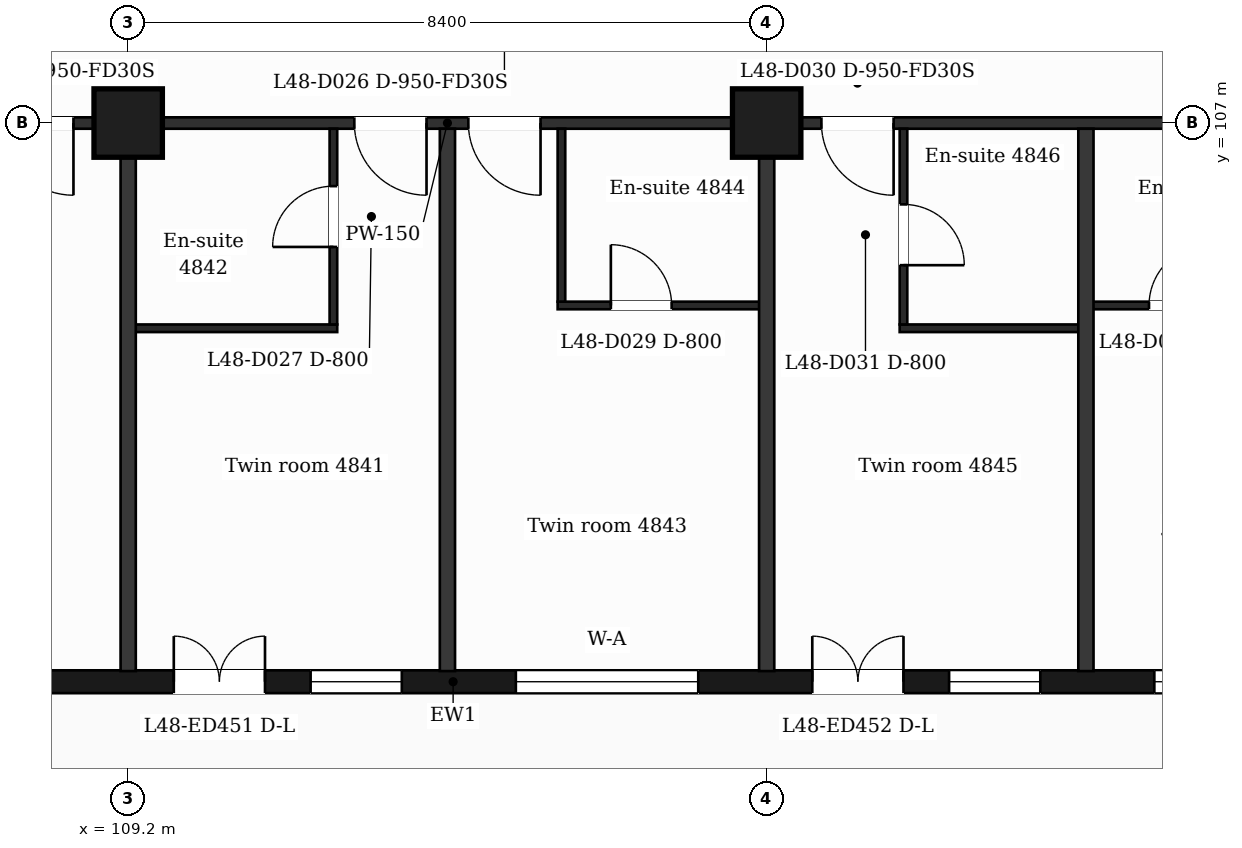
"""IFC4 building model, lengths in metres.
Left out: names, types, materials, properties, quantities, classifications, styles, units other than length and angle.
Written with IfcOpenShell. Run it as: python <this file> out.ifc"""

import sys

from ifc_helpers import new_model, si_unit, direction, frame, frame_2d, origin, origin_2d, place, context, subcontext, project, spatial, rectangle, extrude, element, fill, save


model = new_model("IFC4")
c1 = context("Model", 3, precision=1e-05, world=origin(), true_north=direction((0.0, 1.0)))
c2 = subcontext(c1, "Body", "Model", "MODEL_VIEW")
j1 = project(units=[si_unit("LENGTHUNIT", "METRE"), si_unit("PLANEANGLEUNIT", "RADIAN")], contexts=[c1])
p1 = place(None, origin())
s1 = spatial("IfcSite", under=j1, at=p1, CompositionType="ELEMENT")
p2 = place(p1, origin())
s2 = spatial("IfcBuilding", under=s1, at=p2, CompositionType="ELEMENT")
p3 = place(p2, frame((0.0, 0.0, 202.2)))
s3 = spatial("IfcBuildingStorey", under=s2, at=p3, CompositionType="ELEMENT", Elevation=202.2)
for number, where, z_axis, x_axis in (
    (1, (109.2, 107.0, 0.0), (0.0, 0.0, 1.0), (1.0, 0.0, 0.0)),
    (2, (117.6, 107.0, 0.0), (0.0, 0.0, 1.0), (1.0, 0.0, 0.0)),
):
    element("IfcColumn", number, at=place(p3, frame(where, z_axis=z_axis, x_axis=x_axis)), inside=s3, PredefinedType="COLUMN", context=c2, shape_type="SweptSolid", body=[
        extrude(rectangle(XDim=0.9, YDim=0.9, at=origin_2d()), origin(), (0.0, 0.0, 1.0), 3.7),
    ])
p4 = place(p3, frame((89.85, 99.65, 0.0), z_axis=(0.0, 0.0, 1.0), x_axis=(1.0, 0.0, 0.0)))
e3 = element("IfcWall", 3, at=p4, inside=s3, PredefinedType="SOLIDWALL", context=c2, shape_type="SweptSolid", body=[
    extrude(rectangle(XDim=47.25, YDim=0.3, at=frame_2d((23.625, 0.0))), origin(), (0.0, 0.0, 1.0), 3.38),
])
p5 = place(p4, frame((0.725, 0.0, 0.9)))
e4 = element("IfcOpeningElement", 4, at=p5, cuts=e3, PredefinedType="OPENING", context=c2, shape_type="SweptSolid", body=[
    extrude(rectangle(XDim=1.2, YDim=2.1, at=frame_2d((0.6, 1.05))), frame((0.0, 0.16, 0.0), z_axis=(0.0, -1.0, 0.0), x_axis=(1.0, 0.0, 0.0)), (0.0, 0.0, 1.0), 0.32),
])
p6 = place(p4, frame((3.45, 0.0, 0.9)))
e5 = element("IfcOpeningElement", 5, at=p6, cuts=e3, PredefinedType="OPENING", context=c2, shape_type="SweptSolid", body=[
    extrude(rectangle(XDim=2.4, YDim=2.1, at=frame_2d((1.2, 1.05))), frame((0.0, 0.16, 0.0), z_axis=(0.0, -1.0, 0.0), x_axis=(1.0, 0.0, 0.0)), (0.0, 0.0, 1.0), 0.32),
])
p7 = place(p4, frame((7.65, 0.0, 0.9)))
e6 = element("IfcOpeningElement", 6, at=p7, cuts=e3, PredefinedType="OPENING", context=c2, shape_type="SweptSolid", body=[
    extrude(rectangle(XDim=2.4, YDim=2.1, at=frame_2d((1.2, 1.05))), frame((0.0, 0.16, 0.0), z_axis=(0.0, -1.0, 0.0), x_axis=(1.0, 0.0, 0.0)), (0.0, 0.0, 1.0), 0.32),
])
p8 = place(p4, frame((12.45, 0.0, 0.9)))
e7 = element("IfcOpeningElement", 7, at=p8, cuts=e3, PredefinedType="OPENING", context=c2, shape_type="SweptSolid", body=[
    extrude(rectangle(XDim=1.2, YDim=2.1, at=frame_2d((0.6, 1.05))), frame((0.0, 0.16, 0.0), z_axis=(0.0, -1.0, 0.0), x_axis=(1.0, 0.0, 0.0)), (0.0, 0.0, 1.0), 0.32),
])
p9 = place(p4, frame((16.65, 0.0, 0.9)))
e8 = element("IfcOpeningElement", 8, at=p9, cuts=e3, PredefinedType="OPENING", context=c2, shape_type="SweptSolid", body=[
    extrude(rectangle(XDim=1.2, YDim=2.1, at=frame_2d((0.6, 1.05))), frame((0.0, 0.16, 0.0), z_axis=(0.0, -1.0, 0.0), x_axis=(1.0, 0.0, 0.0)), (0.0, 0.0, 1.0), 0.32),
])
p10 = place(p4, frame((19.95, 0.0, 0.0)))
e9 = element("IfcOpeningElement", 9, at=p10, cuts=e3, PredefinedType="OPENING", context=c2, shape_type="SweptSolid", body=[
    extrude(rectangle(XDim=1.2, YDim=2.4, at=frame_2d((0.6, 1.2))), frame((0.0, 0.16, 0.0), z_axis=(0.0, -1.0, 0.0), x_axis=(1.0, 0.0, 0.0)), (0.0, 0.0, 1.0), 0.32),
])
p11 = place(p4, frame((21.75, 0.0, 0.9)))
e10 = element("IfcOpeningElement", 10, at=p11, cuts=e3, PredefinedType="OPENING", context=c2, shape_type="SweptSolid", body=[
    extrude(rectangle(XDim=1.2, YDim=2.1, at=frame_2d((0.6, 1.05))), frame((0.0, 0.16, 0.0), z_axis=(0.0, -1.0, 0.0), x_axis=(1.0, 0.0, 0.0)), (0.0, 0.0, 1.0), 0.32),
])
p12 = place(p4, frame((24.45, 0.0, 0.9)))
e11 = element("IfcOpeningElement", 11, at=p12, cuts=e3, PredefinedType="OPENING", context=c2, shape_type="SweptSolid", body=[
    extrude(rectangle(XDim=2.4, YDim=2.1, at=frame_2d((1.2, 1.05))), frame((0.0, 0.16, 0.0), z_axis=(0.0, -1.0, 0.0), x_axis=(1.0, 0.0, 0.0)), (0.0, 0.0, 1.0), 0.32),
])
p13 = place(p4, frame((28.35, 0.0, 0.0)))
e12 = element("IfcOpeningElement", 12, at=p13, cuts=e3, PredefinedType="OPENING", context=c2, shape_type="SweptSolid", body=[
    extrude(rectangle(XDim=1.2, YDim=2.4, at=frame_2d((0.6, 1.2))), frame((0.0, 0.16, 0.0), z_axis=(0.0, -1.0, 0.0), x_axis=(1.0, 0.0, 0.0)), (0.0, 0.0, 1.0), 0.32),
])
p14 = place(p4, frame((30.15, 0.0, 0.9)))
e13 = element("IfcOpeningElement", 13, at=p14, cuts=e3, PredefinedType="OPENING", context=c2, shape_type="SweptSolid", body=[
    extrude(rectangle(XDim=1.2, YDim=2.1, at=frame_2d((0.6, 1.05))), frame((0.0, 0.16, 0.0), z_axis=(0.0, -1.0, 0.0), x_axis=(1.0, 0.0, 0.0)), (0.0, 0.0, 1.0), 0.32),
])
p15 = place(p4, frame((32.85, 0.0, 0.9)))
e14 = element("IfcOpeningElement", 14, at=p15, cuts=e3, PredefinedType="OPENING", context=c2, shape_type="SweptSolid", body=[
    extrude(rectangle(XDim=2.4, YDim=2.1, at=frame_2d((1.2, 1.05))), frame((0.0, 0.16, 0.0), z_axis=(0.0, -1.0, 0.0), x_axis=(1.0, 0.0, 0.0)), (0.0, 0.0, 1.0), 0.32),
])
p16 = place(p4, frame((37.05, 0.0, 0.9)))
e15 = element("IfcOpeningElement", 15, at=p16, cuts=e3, PredefinedType="OPENING", context=c2, shape_type="SweptSolid", body=[
    extrude(rectangle(XDim=2.4, YDim=2.1, at=frame_2d((1.2, 1.05))), frame((0.0, 0.16, 0.0), z_axis=(0.0, -1.0, 0.0), x_axis=(1.0, 0.0, 0.0)), (0.0, 0.0, 1.0), 0.32),
])
p17 = place(p4, frame((41.85, 0.0, 0.9)))
e16 = element("IfcOpeningElement", 16, at=p17, cuts=e3, PredefinedType="OPENING", context=c2, shape_type="SweptSolid", body=[
    extrude(rectangle(XDim=1.2, YDim=2.1, at=frame_2d((0.6, 1.05))), frame((0.0, 0.16, 0.0), z_axis=(0.0, -1.0, 0.0), x_axis=(1.0, 0.0, 0.0)), (0.0, 0.0, 1.0), 0.32),
])
p18 = place(p4, frame((45.25, 0.0, 0.9)))
e17 = element("IfcOpeningElement", 17, at=p18, cuts=e3, PredefinedType="OPENING", context=c2, shape_type="SweptSolid", body=[
    extrude(rectangle(XDim=1.2, YDim=2.1, at=frame_2d((0.6, 1.05))), frame((0.0, 0.16, 0.0), z_axis=(0.0, -1.0, 0.0), x_axis=(1.0, 0.0, 0.0)), (0.0, 0.0, 1.0), 0.32),
])
p19 = place(p3, frame((109.2, 104.3, 0.0), z_axis=(0.0, 0.0, 1.0), x_axis=(1.0, 0.0, 0.0)))
e18 = element("IfcWall", 18, at=p19, inside=s3, PredefinedType="PARTITIONING", context=c2, shape_type="SweptSolid", body=[
    extrude(rectangle(XDim=2.75, YDim=0.1, at=frame_2d((1.375, 0.0))), origin(), (0.0, 0.0, 1.0), 3.38),
])
p20 = place(p3, frame((119.35, 104.3, 0.0), z_axis=(0.0, 0.0, 1.0), x_axis=(1.0, 0.0, 0.0)))
e19 = element("IfcWall", 19, at=p20, inside=s3, PredefinedType="PARTITIONING", context=c2, shape_type="SweptSolid", body=[
    extrude(rectangle(XDim=2.45, YDim=0.1, at=frame_2d((1.225, 0.0))), origin(), (0.0, 0.0, 1.0), 3.38),
])
p21 = place(p3, frame((114.85, 104.6, 0.0), z_axis=(0.0, 0.0, 1.0), x_axis=(1.0, 0.0, 0.0)))
e20 = element("IfcWall", 20, at=p21, inside=s3, PredefinedType="PARTITIONING", context=c2, shape_type="SweptSolid", body=[
    extrude(rectangle(XDim=2.75, YDim=0.1, at=frame_2d((1.375, 0.0))), origin(), (0.0, 0.0, 1.0), 3.38),
])
p22 = place(p21, frame((0.7, 0.0, 0.0)))
e21 = element("IfcOpeningElement", 21, at=p22, cuts=e20, PredefinedType="OPENING", context=c2, shape_type="SweptSolid", body=[
    extrude(rectangle(XDim=0.8, YDim=2.1, at=frame_2d((0.4, 1.05))), frame((0.0, 0.06, 0.0), z_axis=(0.0, -1.0, 0.0), x_axis=(1.0, 0.0, 0.0)), (0.0, 0.0, 1.0), 0.12),
])
p23 = place(p3, frame((121.8, 104.6, 0.0), z_axis=(0.0, 0.0, 1.0), x_axis=(1.0, 0.0, 0.0)))
e22 = element("IfcWall", 22, at=p23, inside=s3, PredefinedType="PARTITIONING", context=c2, shape_type="SweptSolid", body=[
    extrude(rectangle(XDim=2.75, YDim=0.1, at=frame_2d((1.375, 0.0))), origin(), (0.0, 0.0, 1.0), 3.38),
])
p24 = place(p23, frame((0.83, 0.0, 0.0)))
e23 = element("IfcOpeningElement", 23, at=p24, cuts=e22, PredefinedType="OPENING", context=c2, shape_type="SweptSolid", body=[
    extrude(rectangle(XDim=0.8, YDim=2.1, at=frame_2d((0.4, 1.05))), frame((0.0, 0.06, 0.0), z_axis=(0.0, -1.0, 0.0), x_axis=(1.0, 0.0, 0.0)), (0.0, 0.0, 1.0), 0.12),
])
p25 = place(p3, frame((87.018, 107.0, 0.0), z_axis=(0.0, 0.0, 1.0), x_axis=(1.0, 0.0, 0.0)))
e24 = element("IfcWall", 24, at=p25, inside=s3, PredefinedType="PARTITIONING", context=c2, shape_type="SweptSolid", body=[
    extrude(rectangle(XDim=52.765, YDim=0.15, at=frame_2d((26.382, 0.0))), origin(), (0.0, 0.0, 1.0), 3.38),
])
p26 = place(p25, frame((1.276, 0.0, 0.0)))
e25 = element("IfcOpeningElement", 25, at=p26, cuts=e24, PredefinedType="OPENING", context=c2, shape_type="SweptSolid", body=[
    extrude(rectangle(XDim=0.95, YDim=2.1, at=frame_2d((0.475, 1.05))), frame((0.0, 0.085, 0.0), z_axis=(0.0, -1.0, 0.0), x_axis=(1.0, 0.0, 0.0)), (0.0, 0.0, 1.0), 0.17),
])
p27 = place(p25, frame((6.369, 0.0, 0.0)))
e26 = element("IfcOpeningElement", 26, at=p27, cuts=e24, PredefinedType="OPENING", context=c2, shape_type="SweptSolid", body=[
    extrude(rectangle(XDim=0.95, YDim=2.1, at=frame_2d((0.475, 1.05))), frame((0.0, 0.085, 0.0), z_axis=(0.0, -1.0, 0.0), x_axis=(1.0, 0.0, 0.0)), (0.0, 0.0, 1.0), 0.17),
])
p28 = place(p25, frame((12.112, 0.0, 0.0)))
e27 = element("IfcOpeningElement", 27, at=p28, cuts=e24, PredefinedType="OPENING", context=c2, shape_type="SweptSolid", body=[
    extrude(rectangle(XDim=0.95, YDim=2.1, at=frame_2d((0.475, 1.05))), frame((0.0, 0.085, 0.0), z_axis=(0.0, -1.0, 0.0), x_axis=(1.0, 0.0, 0.0)), (0.0, 0.0, 1.0), 0.17),
])
p29 = place(p25, frame((14.582, 0.0, 0.0)))
e28 = element("IfcOpeningElement", 28, at=p29, cuts=e24, PredefinedType="OPENING", context=c2, shape_type="SweptSolid", body=[
    extrude(rectangle(XDim=0.95, YDim=2.1, at=frame_2d((0.475, 1.05))), frame((0.0, 0.085, 0.0), z_axis=(0.0, -1.0, 0.0), x_axis=(1.0, 0.0, 0.0)), (0.0, 0.0, 1.0), 0.17),
])
p30 = place(p25, frame((20.512, 0.0, 0.0)))
e29 = element("IfcOpeningElement", 29, at=p30, cuts=e24, PredefinedType="OPENING", context=c2, shape_type="SweptSolid", body=[
    extrude(rectangle(XDim=0.95, YDim=2.1, at=frame_2d((0.475, 1.05))), frame((0.0, 0.085, 0.0), z_axis=(0.0, -1.0, 0.0), x_axis=(1.0, 0.0, 0.0)), (0.0, 0.0, 1.0), 0.17),
])
p31 = place(p25, frame((25.157, 0.0, 0.0)))
e30 = element("IfcOpeningElement", 30, at=p31, cuts=e24, PredefinedType="OPENING", context=c2, shape_type="SweptSolid", body=[
    extrude(rectangle(XDim=0.95, YDim=2.1, at=frame_2d((0.475, 1.05))), frame((0.0, 0.085, 0.0), z_axis=(0.0, -1.0, 0.0), x_axis=(1.0, 0.0, 0.0)), (0.0, 0.0, 1.0), 0.17),
])
p32 = place(p25, frame((26.657, 0.0, 0.0)))
e31 = element("IfcOpeningElement", 31, at=p32, cuts=e24, PredefinedType="OPENING", context=c2, shape_type="SweptSolid", body=[
    extrude(rectangle(XDim=0.95, YDim=2.1, at=frame_2d((0.475, 1.05))), frame((0.0, 0.085, 0.0), z_axis=(0.0, -1.0, 0.0), x_axis=(1.0, 0.0, 0.0)), (0.0, 0.0, 1.0), 0.17),
])
p33 = place(p25, frame((31.302, 0.0, 0.0)))
e32 = element("IfcOpeningElement", 32, at=p33, cuts=e24, PredefinedType="OPENING", context=c2, shape_type="SweptSolid", body=[
    extrude(rectangle(XDim=0.95, YDim=2.1, at=frame_2d((0.475, 1.05))), frame((0.0, 0.085, 0.0), z_axis=(0.0, -1.0, 0.0), x_axis=(1.0, 0.0, 0.0)), (0.0, 0.0, 1.0), 0.17),
])
p34 = place(p25, frame((41.207, 0.0, 0.0)))
e33 = element("IfcOpeningElement", 33, at=p34, cuts=e24, PredefinedType="OPENING", context=c2, shape_type="SweptSolid", body=[
    extrude(rectangle(XDim=1.0, YDim=2.1, at=frame_2d((0.5, 1.05))), frame((0.0, 0.085, 0.0), z_axis=(0.0, -1.0, 0.0), x_axis=(1.0, 0.0, 0.0)), (0.0, 0.0, 1.0), 0.17),
])
p35 = place(p25, frame((43.907, 0.0, 0.0)))
e34 = element("IfcOpeningElement", 34, at=p35, cuts=e24, PredefinedType="OPENING", context=c2, shape_type="SweptSolid", body=[
    extrude(rectangle(XDim=0.95, YDim=2.1, at=frame_2d((0.475, 1.05))), frame((0.0, 0.085, 0.0), z_axis=(0.0, -1.0, 0.0), x_axis=(1.0, 0.0, 0.0)), (0.0, 0.0, 1.0), 0.17),
])
p36 = place(p25, frame((49.285, 0.0, 0.0)))
e35 = element("IfcOpeningElement", 35, at=p36, cuts=e24, PredefinedType="OPENING", context=c2, shape_type="SweptSolid", body=[
    extrude(rectangle(XDim=0.95, YDim=2.1, at=frame_2d((0.475, 1.05))), frame((0.0, 0.085, 0.0), z_axis=(0.0, -1.0, 0.0), x_axis=(1.0, 0.0, 0.0)), (0.0, 0.0, 1.0), 0.17),
])
p37 = place(p3, frame((109.2, 99.79, 0.0), z_axis=(0.0, 0.0, 1.0), x_axis=(0.0, 1.0, 0.0)))
e36 = element("IfcWall", 36, at=p37, inside=s3, PredefinedType="PARTITIONING", context=c2, shape_type="SweptSolid", body=[
    extrude(rectangle(XDim=7.135, YDim=0.2, at=frame_2d((3.567, 0.0))), origin(), (0.0, 0.0, 1.0), 3.38),
])
p38 = place(p3, frame((111.9, 104.35, 0.0), z_axis=(0.0, 0.0, 1.0), x_axis=(0.0, 1.0, 0.0)))
e37 = element("IfcWall", 37, at=p38, inside=s3, PredefinedType="PARTITIONING", context=c2, shape_type="SweptSolid", body=[
    extrude(rectangle(XDim=2.575, YDim=0.1, at=frame_2d((1.288, 0.0))), origin(), (0.0, 0.0, 1.0), 3.38),
])
p39 = place(p38, frame((1.02, 0.0, 0.0)))
e38 = element("IfcOpeningElement", 38, at=p39, cuts=e37, PredefinedType="OPENING", context=c2, shape_type="SweptSolid", body=[
    extrude(rectangle(XDim=0.8, YDim=2.1, at=frame_2d((0.4, 1.05))), frame((0.0, 0.06, 0.0), z_axis=(0.0, -1.0, 0.0), x_axis=(1.0, 0.0, 0.0)), (0.0, 0.0, 1.0), 0.12),
])
p40 = place(p3, frame((113.4, 99.79, 0.0), z_axis=(0.0, 0.0, 1.0), x_axis=(0.0, 1.0, 0.0)))
e39 = element("IfcWall", 39, at=p40, inside=s3, PredefinedType="PARTITIONING", context=c2, shape_type="SweptSolid", body=[
    extrude(rectangle(XDim=7.135, YDim=0.2, at=frame_2d((3.567, 0.0))), origin(), (0.0, 0.0, 1.0), 3.38),
])
p41 = place(p3, frame((114.9, 104.65, 0.0), z_axis=(0.0, 0.0, 1.0), x_axis=(0.0, 1.0, 0.0)))
e40 = element("IfcWall", 40, at=p41, inside=s3, PredefinedType="PARTITIONING", context=c2, shape_type="SweptSolid", body=[
    extrude(rectangle(XDim=2.275, YDim=0.1, at=frame_2d((1.138, 0.0))), origin(), (0.0, 0.0, 1.0), 3.38),
])
p42 = place(p3, frame((117.6, 99.79, 0.0), z_axis=(0.0, 0.0, 1.0), x_axis=(0.0, 1.0, 0.0)))
e41 = element("IfcWall", 41, at=p42, inside=s3, PredefinedType="PARTITIONING", context=c2, shape_type="SweptSolid", body=[
    extrude(rectangle(XDim=7.135, YDim=0.2, at=frame_2d((3.567, 0.0))), origin(), (0.0, 0.0, 1.0), 3.38),
])
p43 = place(p3, frame((119.4, 104.35, 0.0), z_axis=(0.0, 0.0, 1.0), x_axis=(0.0, 1.0, 0.0)))
e42 = element("IfcWall", 42, at=p43, inside=s3, PredefinedType="PARTITIONING", context=c2, shape_type="SweptSolid", body=[
    extrude(rectangle(XDim=2.575, YDim=0.1, at=frame_2d((1.288, 0.0))), origin(), (0.0, 0.0, 1.0), 3.38),
])
p44 = place(p43, frame((0.78, 0.0, 0.0)))
e43 = element("IfcOpeningElement", 43, at=p44, cuts=e42, PredefinedType="OPENING", context=c2, shape_type="SweptSolid", body=[
    extrude(rectangle(XDim=0.8, YDim=2.1, at=frame_2d((0.4, 1.05))), frame((0.0, 0.06, 0.0), z_axis=(0.0, -1.0, 0.0), x_axis=(1.0, 0.0, 0.0)), (0.0, 0.0, 1.0), 0.12),
])
p45 = place(p3, frame((121.8, 99.79, 0.0), z_axis=(0.0, 0.0, 1.0), x_axis=(0.0, 1.0, 0.0)))
e44 = element("IfcWall", 44, at=p45, inside=s3, PredefinedType="PARTITIONING", context=c2, shape_type="SweptSolid", body=[
    extrude(rectangle(XDim=7.135, YDim=0.2, at=frame_2d((3.567, 0.0))), origin(), (0.0, 0.0, 1.0), 3.38),
])
p46 = place(p10, origin())
e45 = element("IfcDoor", 45, at=p46, inside=s3, OperationType="DOUBLE_DOOR_SINGLE_SWING", PredefinedType="DOOR", context=c2, shape_type="SweptSolid", body=[
    extrude(rectangle(XDim=1.2, YDim=2.4, at=frame_2d((0.6, 1.2))), frame((0.0, 0.025, 0.0), z_axis=(0.0, -1.0, 0.0), x_axis=(1.0, 0.0, 0.0)), (0.0, 0.0, 1.0), 0.05),
])
fill(e9, e45)
p47 = place(p11, origin())
e46 = element("IfcWindow", 46, at=p47, inside=s3, PartitioningType="SINGLE_PANEL", PredefinedType="WINDOW", context=c2, shape_type="SweptSolid", body=[
    extrude(rectangle(XDim=1.2, YDim=2.1, at=frame_2d((0.6, 1.05))), frame((0.0, 0.03, 0.0), z_axis=(0.0, -1.0, 0.0), x_axis=(1.0, 0.0, 0.0)), (0.0, 0.0, 1.0), 0.06),
])
fill(e10, e46)
p48 = place(p12, origin())
e47 = element("IfcWindow", 47, at=p48, inside=s3, PartitioningType="SINGLE_PANEL", PredefinedType="WINDOW", context=c2, shape_type="SweptSolid", body=[
    extrude(rectangle(XDim=2.4, YDim=2.1, at=frame_2d((1.2, 1.05))), frame((0.0, 0.03, 0.0), z_axis=(0.0, -1.0, 0.0), x_axis=(1.0, 0.0, 0.0)), (0.0, 0.0, 1.0), 0.06),
])
fill(e11, e47)
p49 = place(p13, origin())
e48 = element("IfcDoor", 48, at=p49, inside=s3, OperationType="DOUBLE_DOOR_SINGLE_SWING", PredefinedType="DOOR", context=c2, shape_type="SweptSolid", body=[
    extrude(rectangle(XDim=1.2, YDim=2.4, at=frame_2d((0.6, 1.2))), frame((0.0, 0.025, 0.0), z_axis=(0.0, -1.0, 0.0), x_axis=(1.0, 0.0, 0.0)), (0.0, 0.0, 1.0), 0.05),
])
fill(e12, e48)
p50 = place(p14, origin())
e49 = element("IfcWindow", 49, at=p50, inside=s3, PartitioningType="SINGLE_PANEL", PredefinedType="WINDOW", context=c2, shape_type="SweptSolid", body=[
    extrude(rectangle(XDim=1.2, YDim=2.1, at=frame_2d((0.6, 1.05))), frame((0.0, 0.03, 0.0), z_axis=(0.0, -1.0, 0.0), x_axis=(1.0, 0.0, 0.0)), (0.0, 0.0, 1.0), 0.06),
])
fill(e13, e49)
p51 = place(p15, origin())
e50 = element("IfcWindow", 50, at=p51, inside=s3, PartitioningType="SINGLE_PANEL", PredefinedType="WINDOW", context=c2, shape_type="SweptSolid", body=[
    extrude(rectangle(XDim=2.4, YDim=2.1, at=frame_2d((1.2, 1.05))), frame((0.0, 0.03, 0.0), z_axis=(0.0, -1.0, 0.0), x_axis=(1.0, 0.0, 0.0)), (0.0, 0.0, 1.0), 0.06),
])
fill(e14, e50)
p52 = place(p30, origin())
e51 = element("IfcDoor", 51, at=p52, inside=s3, OperationType="SINGLE_SWING_RIGHT", PredefinedType="DOOR", context=c2, shape_type="SweptSolid", body=[
    extrude(rectangle(XDim=0.95, YDim=2.1, at=frame_2d((0.475, 1.05))), frame((0.0, 0.025, 0.0), z_axis=(0.0, -1.0, 0.0), x_axis=(1.0, 0.0, 0.0)), (0.0, 0.0, 1.0), 0.05),
])
fill(e29, e51)
p53 = place(p31, origin())
e52 = element("IfcDoor", 52, at=p53, inside=s3, OperationType="SINGLE_SWING_RIGHT", PredefinedType="DOOR", context=c2, shape_type="SweptSolid", body=[
    extrude(rectangle(XDim=0.95, YDim=2.1, at=frame_2d((0.475, 1.05))), frame((0.0, 0.025, 0.0), z_axis=(0.0, -1.0, 0.0), x_axis=(1.0, 0.0, 0.0)), (0.0, 0.0, 1.0), 0.05),
])
fill(e30, e52)
p54 = place(p39, origin())
e53 = element("IfcDoor", 53, at=p54, inside=s3, OperationType="SINGLE_SWING_LEFT", PredefinedType="DOOR", context=c2, shape_type="SweptSolid", body=[
    extrude(rectangle(XDim=0.8, YDim=2.1, at=frame_2d((0.4, 1.05))), frame((0.0, 0.025, 0.0), z_axis=(0.0, -1.0, 0.0), x_axis=(1.0, 0.0, 0.0)), (0.0, 0.0, 1.0), 0.05),
])
fill(e38, e53)
p55 = place(p32, origin())
e54 = element("IfcDoor", 54, at=p55, inside=s3, OperationType="SINGLE_SWING_RIGHT", PredefinedType="DOOR", context=c2, shape_type="SweptSolid", body=[
    extrude(rectangle(XDim=0.95, YDim=2.1, at=frame_2d((0.475, 1.05))), frame((0.0, 0.025, 0.0), z_axis=(0.0, -1.0, 0.0), x_axis=(1.0, 0.0, 0.0)), (0.0, 0.0, 1.0), 0.05),
])
fill(e31, e54)
p56 = place(p22, origin())
e55 = element("IfcDoor", 55, at=p56, inside=s3, OperationType="SINGLE_SWING_LEFT", PredefinedType="DOOR", context=c2, shape_type="SweptSolid", body=[
    extrude(rectangle(XDim=0.8, YDim=2.1, at=frame_2d((0.4, 1.05))), frame((0.0, 0.025, 0.0), z_axis=(0.0, -1.0, 0.0), x_axis=(1.0, 0.0, 0.0)), (0.0, 0.0, 1.0), 0.05),
])
fill(e21, e55)
p57 = place(p33, origin())
e56 = element("IfcDoor", 56, at=p57, inside=s3, OperationType="SINGLE_SWING_RIGHT", PredefinedType="DOOR", context=c2, shape_type="SweptSolid", body=[
    extrude(rectangle(XDim=0.95, YDim=2.1, at=frame_2d((0.475, 1.05))), frame((0.0, 0.025, 0.0), z_axis=(0.0, -1.0, 0.0), x_axis=(1.0, 0.0, 0.0)), (0.0, 0.0, 1.0), 0.05),
])
fill(e32, e56)
p58 = place(p44, origin())
e57 = element("IfcDoor", 57, at=p58, inside=s3, OperationType="SINGLE_SWING_LEFT", PredefinedType="DOOR", context=c2, shape_type="SweptSolid", body=[
    extrude(rectangle(XDim=0.8, YDim=2.1, at=frame_2d((0.4, 1.05))), frame((0.0, 0.025, 0.0), z_axis=(0.0, -1.0, 0.0), x_axis=(1.0, 0.0, 0.0)), (0.0, 0.0, 1.0), 0.05),
])
fill(e43, e57)
p59 = place(p24, origin())
e58 = element("IfcDoor", 58, at=p59, inside=s3, OperationType="SINGLE_SWING_RIGHT", PredefinedType="DOOR", context=c2, shape_type="SweptSolid", body=[
    extrude(rectangle(XDim=0.8, YDim=2.1, at=frame_2d((0.4, 1.05))), frame((0.0, 0.025, 0.0), z_axis=(0.0, -1.0, 0.0), x_axis=(1.0, 0.0, 0.0)), (0.0, 0.0, 1.0), 0.05),
])
fill(e23, e58)
save(model, sys.argv[1])
